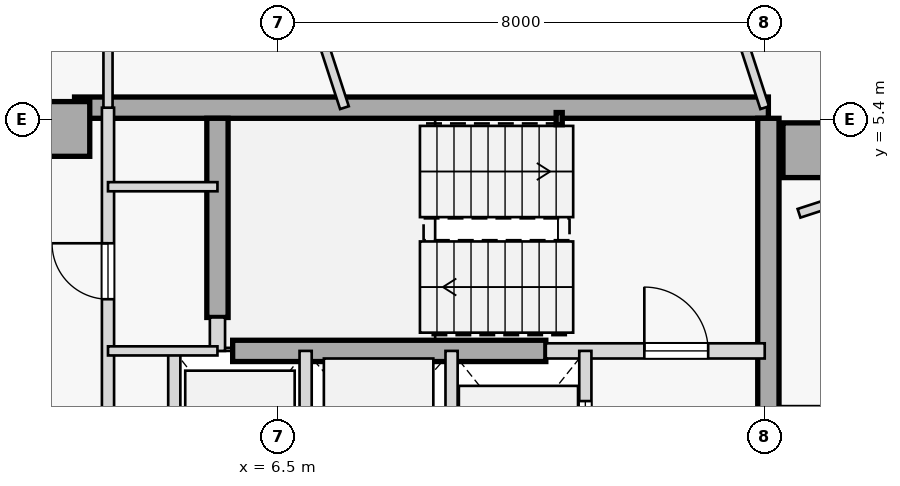
"""IFC4 building model, lengths in metres.
Left out: names, types, materials, properties, quantities, classifications, styles, units other than length and angle.
Written with IfcOpenShell. Run it as: python <this file> out.ifc"""

import sys

from ifc_helpers import new_model, si_unit, direction, frame, frame_2d, origin, origin_2d, place, context, subcontext, project, spatial, rectangle, hollow_rectangle, extrude, element, fill, save


model = new_model("IFC4")
c1 = context("Model", 3, precision=1e-05, world=origin(), true_north=direction((0.0, 1.0)))
c2 = subcontext(c1, "Body", "Model", "MODEL_VIEW")
j1 = project(units=[si_unit("LENGTHUNIT", "METRE"), si_unit("PLANEANGLEUNIT", "RADIAN")], contexts=[c1])
p1 = place(None, origin())
s1 = spatial("IfcSite", under=j1, at=p1, CompositionType="ELEMENT")
p2 = place(p1, origin())
s2 = spatial("IfcBuilding", under=s1, at=p2, CompositionType="ELEMENT")
p3 = place(p2, frame((0.0, 0.0, 251.1)))
s3 = spatial("IfcBuildingStorey", under=s2, at=p3, CompositionType="ELEMENT", Elevation=251.1)
for number, where, z_axis, x_axis in (
    (1, (15.25, 4.9, 0.0), (0.0, 0.0, 1.0), (1.0, 0.0, 0.0)),
    (2, (2.95, 5.25, 0.0), (0.0, 0.0, 1.0), (1.0, 0.0, 0.0)),
):
    element("IfcColumn", number, at=place(p3, frame(where, z_axis=z_axis, x_axis=x_axis)), inside=s3, PredefinedType="COLUMN", context=c2, shape_type="SweptSolid", body=[
        extrude(rectangle(XDim=0.9, YDim=0.9, at=origin_2d()), origin(), (0.0, 0.0, 1.0), 3.35),
    ])
p4 = place(p3, frame((3.15, 5.6, 0.0), z_axis=(0.0, 0.0, 1.0), x_axis=(1.0, 0.0, 0.0)))
e3 = element("IfcWall", 3, at=p4, inside=s3, PredefinedType="SHEAR", context=c2, shape_type="SweptSolid", body=[
    extrude(rectangle(XDim=11.41, YDim=0.35, at=frame_2d((5.705, 0.0))), origin(), (0.0, 0.0, 1.0), 2.95),
])
p5 = place(p3, frame((14.56, -5.425, 0.0), z_axis=(0.0, 0.0, 1.0), x_axis=(0.0, 1.0, 0.0)))
e4 = element("IfcWall", 4, at=p5, inside=s3, PredefinedType="SHEAR", context=c2, shape_type="SweptSolid", body=[
    extrude(rectangle(XDim=10.85, YDim=0.35, at=frame_2d((5.425, 0.0))), origin(), (0.0, 0.0, 1.0), 2.95),
])
p6 = place(p3, frame((5.5, 2.15, 0.0), z_axis=(0.0, 0.0, 1.0), x_axis=(0.0, 1.0, 0.0)))
e5 = element("IfcWall", 5, at=p6, inside=s3, PredefinedType="SHEAR", context=c2, shape_type="SweptSolid", body=[
    extrude(rectangle(XDim=3.275, YDim=0.35, at=frame_2d((1.638, 0.0))), origin(), (0.0, 0.0, 1.0), 2.95),
])
p7 = place(p3, frame((5.75, 1.6, 0.0), z_axis=(0.0, 0.0, 1.0), x_axis=(1.0, 0.0, 0.0)))
e6 = element("IfcWall", 6, at=p7, inside=s3, PredefinedType="SHEAR", context=c2, shape_type="SweptSolid", body=[
    extrude(rectangle(XDim=5.15, YDim=0.35, at=frame_2d((2.575, 0.0))), origin(), (0.0, 0.0, 1.0), 2.95),
])
p8 = place(p3, frame((11.12, 5.42, 0.0), z_axis=(0.0, 0.0, 1.0), x_axis=(1.0, 0.0, 0.0)))
e7 = element("IfcColumn", 7, at=p8, inside=s3, PredefinedType="COLUMN", context=c2, shape_type="SweptSolid", body=[
    extrude(hollow_rectangle(XDim=0.1, YDim=0.2, WallThickness=0.008, at=origin_2d()), origin(), (0.0, 0.0, 1.0), 3.35),
])
p9 = place(p3, frame((10.9, 1.6, 0.0), z_axis=(0.0, 0.0, 1.0), x_axis=(1.0, 0.0, 0.0)))
e8 = element("IfcWall", 8, at=p9, inside=s3, PredefinedType="STANDARD", context=c2, shape_type="SweptSolid", body=[
    extrude(rectangle(XDim=3.6, YDim=0.25, at=frame_2d((1.8, 0.0))), origin(), (0.0, 0.0, 1.0), 2.95),
])
p10 = place(p9, frame((1.62, 0.0, 0.0)))
e9 = element("IfcOpeningElement", 9, at=p10, cuts=e8, PredefinedType="OPENING", context=c2, shape_type="SweptSolid", body=[
    extrude(rectangle(XDim=1.05, YDim=2.15, at=frame_2d((0.525, 1.075))), frame((0.0, 0.135, 0.0), z_axis=(0.0, -1.0, 0.0), x_axis=(1.0, 0.0, 0.0)), (0.0, 0.0, 1.0), 0.27),
])
p11 = place(p3, frame((5.5, 1.6, 0.0), z_axis=(0.0, 0.0, 1.0), x_axis=(0.0, 1.0, 0.0)))
e10 = element("IfcWall", 10, at=p11, inside=s3, PredefinedType="STANDARD", context=c2, shape_type="SweptSolid", body=[
    extrude(rectangle(XDim=0.55, YDim=0.25, at=frame_2d((0.275, 0.0))), origin(), (0.0, 0.0, 1.0), 2.95),
])
p12 = place(p3, frame((3.7, -1.15, 0.0), z_axis=(0.0, 0.0, 1.0), x_axis=(0.0, 1.0, 0.0)))
e11 = element("IfcWall", 11, at=p12, inside=s3, PredefinedType="STANDARD", context=c2, shape_type="SweptSolid", body=[
    extrude(rectangle(XDim=6.75, YDim=0.2, at=frame_2d((3.375, 0.0))), origin(), (0.0, 0.0, 1.0), 2.95),
])
p13 = place(p12, frame((3.6, 0.0, 0.0)))
e12 = element("IfcOpeningElement", 12, at=p13, cuts=e11, PredefinedType="OPENING", context=c2, shape_type="SweptSolid", body=[
    extrude(rectangle(XDim=0.92, YDim=2.15, at=frame_2d((0.46, 1.075))), frame((0.0, 0.11, 0.0), z_axis=(0.0, -1.0, 0.0), x_axis=(1.0, 0.0, 0.0)), (0.0, 0.0, 1.0), 0.22),
])
p14 = place(p12, frame((0.85, 0.0, 0.0)))
e13 = element("IfcOpeningElement", 13, at=p14, cuts=e11, PredefinedType="OPENING", context=c2, shape_type="SweptSolid", body=[
    extrude(rectangle(XDim=0.9, YDim=2.15, at=frame_2d((0.45, 1.075))), frame((0.0, 0.11, 0.0), z_axis=(0.0, -1.0, 0.0), x_axis=(1.0, 0.0, 0.0)), (0.0, 0.0, 1.0), 0.22),
])
p15 = place(p3, frame((11.55, -1.15, 0.0), z_axis=(0.0, 0.0, 1.0), x_axis=(0.0, 1.0, 0.0)))
e14 = element("IfcWall", 14, at=p15, inside=s3, PredefinedType="STANDARD", context=c2, shape_type="SweptSolid", body=[
    extrude(rectangle(XDim=2.75, YDim=0.2, at=frame_2d((1.375, 0.0))), origin(), (0.0, 0.0, 1.0), 2.95),
])
p16 = place(p15, frame((0.825, 0.0, 0.0)))
e15 = element("IfcOpeningElement", 15, at=p16, cuts=e14, PredefinedType="OPENING", context=c2, shape_type="SweptSolid", body=[
    extrude(rectangle(XDim=1.1, YDim=2.15, at=frame_2d((0.55, 1.075))), frame((0.0, 0.11, 0.0), z_axis=(0.0, -1.0, 0.0), x_axis=(1.0, 0.0, 0.0)), (0.0, 0.0, 1.0), 0.22),
])
for number, where, z_axis, x_axis in (
    (16, (9.35, -1.15, 0.0), (0.0, 0.0, 1.0), (0.0, 1.0, 0.0)),
    (17, (6.95, -1.15, 0.0), (0.0, 0.0, 1.0), (0.0, 1.0, 0.0)),
    (18, (4.79, -1.15, 0.0), (0.0, 0.0, 1.0), (0.0, 1.0, 0.0)),
):
    element("IfcWall", number, at=place(p3, frame(where, z_axis=z_axis, x_axis=x_axis)), inside=s3, PredefinedType="STANDARD", context=c2, shape_type="SweptSolid", body=[
        extrude(rectangle(XDim=2.75, YDim=0.2, at=frame_2d((1.375, 0.0))), origin(), (0.0, 0.0, 1.0), 2.95),
    ])
for number, where, z_axis, x_axis in (
    (19, (3.7, 4.3, 0.0), (0.0, 0.0, 1.0), (1.0, 0.0, 0.0)),
    (20, (3.7, 1.6, 0.0), (0.0, 0.0, 1.0), (1.0, 0.0, 0.0)),
):
    element("IfcWall", number, at=place(p3, frame(where, z_axis=z_axis, x_axis=x_axis)), inside=s3, PredefinedType="PARTITIONING", context=c2, shape_type="SweptSolid", body=[
        extrude(rectangle(XDim=1.8, YDim=0.15, at=frame_2d((0.9, 0.0))), origin(), (0.0, 0.0, 1.0), 2.95),
    ])
p17 = place(p3, frame((3.7, 5.6, 0.0), z_axis=(0.0, 0.0, 1.0), x_axis=(-0.000123839008, 0.999999992332, 0.0)))
e21 = element("IfcWall", 21, at=p17, inside=s3, PredefinedType="PARTITIONING", context=c2, shape_type="SweptSolid", body=[
    extrude(rectangle(XDim=5.914, YDim=0.15, at=frame_2d((2.957, 0.0))), origin(), (0.0, 0.0, 1.0), 2.5),
])
p18 = place(p17, frame((2.497, 0.0, 0.0)))
e22 = element("IfcOpeningElement", 22, at=p18, cuts=e21, PredefinedType="OPENING", context=c2, shape_type="SweptSolid", body=[
    extrude(rectangle(XDim=0.92, YDim=2.15, at=frame_2d((0.46, 1.075))), frame((0.0, 0.085, 0.0), z_axis=(0.0, -1.0, 0.0), x_axis=(1.0, 0.0, 0.0)), (0.0, 0.0, 1.0), 0.17),
])
p19 = place(p3, frame((7.588, 5.6, 0.0), z_axis=(0.0, 0.0, 1.0), x_axis=(-0.309018946982, 0.951055881852, 0.0)))
e23 = element("IfcWall", 23, at=p19, inside=s3, PredefinedType="PARTITIONING", context=c2, shape_type="SweptSolid", body=[
    extrude(rectangle(XDim=6.826, YDim=0.15, at=frame_2d((3.413, 0.0))), origin(), (0.0, 0.0, 1.0), 2.95),
])
p20 = place(p3, frame((14.5, 5.6, 0.0), z_axis=(0.0, 0.0, 1.0), x_axis=(-0.308974360462, 0.951070367837, 0.0)))
e24 = element("IfcWall", 24, at=p20, inside=s3, PredefinedType="PARTITIONING", context=c2, shape_type="SweptSolid", body=[
    extrude(rectangle(XDim=4.843, YDim=0.15, at=frame_2d((2.421, 0.0))), origin(), (0.0, 0.0, 1.0), 2.95),
])
p21 = place(p3, frame((15.064, 3.863, 0.0), z_axis=(0.0, 0.0, 1.0), x_axis=(0.951061448945, 0.309001812827, 0.0)))
e25 = element("IfcWall", 25, at=p21, inside=s3, PredefinedType="PARTITIONING", context=c2, shape_type="SweptSolid", body=[
    extrude(rectangle(XDim=10.352, YDim=0.15, at=frame_2d((5.176, 0.0))), origin(), (0.0, 0.0, 1.0), 2.5),
])
p22 = place(p21, frame((4.716, 0.0, 0.0)))
e26 = element("IfcOpeningElement", 26, at=p22, cuts=e25, PredefinedType="OPENING", context=c2, shape_type="SweptSolid", body=[
    extrude(rectangle(XDim=0.92, YDim=2.15, at=frame_2d((0.46, 1.075))), frame((0.0, 0.085, 0.0), z_axis=(0.0, -1.0, 0.0), x_axis=(1.0, 0.0, 0.0)), (0.0, 0.0, 1.0), 0.17),
])
p23 = place(p10, origin())
e27 = element("IfcDoor", 27, at=p23, inside=s3, OperationType="SINGLE_SWING_LEFT", PredefinedType="DOOR", context=c2, shape_type="SweptSolid", body=[
    extrude(rectangle(XDim=1.05, YDim=2.15, at=frame_2d((0.525, 1.075))), frame((0.0, 0.025, 0.0), z_axis=(0.0, -1.0, 0.0), x_axis=(1.0, 0.0, 0.0)), (0.0, 0.0, 1.0), 0.05),
])
fill(e9, e27)
p24 = place(p16, origin())
e28 = element("IfcDoor", 28, at=p24, inside=s3, OperationType="SLIDING_TO_RIGHT", PredefinedType="DOOR", context=c2, shape_type="SweptSolid", body=[
    extrude(rectangle(XDim=1.1, YDim=2.15, at=frame_2d((0.55, 1.075))), frame((0.0, 0.025, 0.0), z_axis=(0.0, -1.0, 0.0), x_axis=(1.0, 0.0, 0.0)), (0.0, 0.0, 1.0), 0.05),
])
fill(e15, e28)
p25 = place(p13, origin())
e29 = element("IfcDoor", 29, at=p25, inside=s3, OperationType="SINGLE_SWING_RIGHT", PredefinedType="DOOR", context=c2, shape_type="SweptSolid", body=[
    extrude(rectangle(XDim=0.92, YDim=2.15, at=frame_2d((0.46, 1.075))), frame((0.0, 0.025, 0.0), z_axis=(0.0, -1.0, 0.0), x_axis=(1.0, 0.0, 0.0)), (0.0, 0.0, 1.0), 0.05),
])
fill(e12, e29)
save(model, sys.argv[1])
